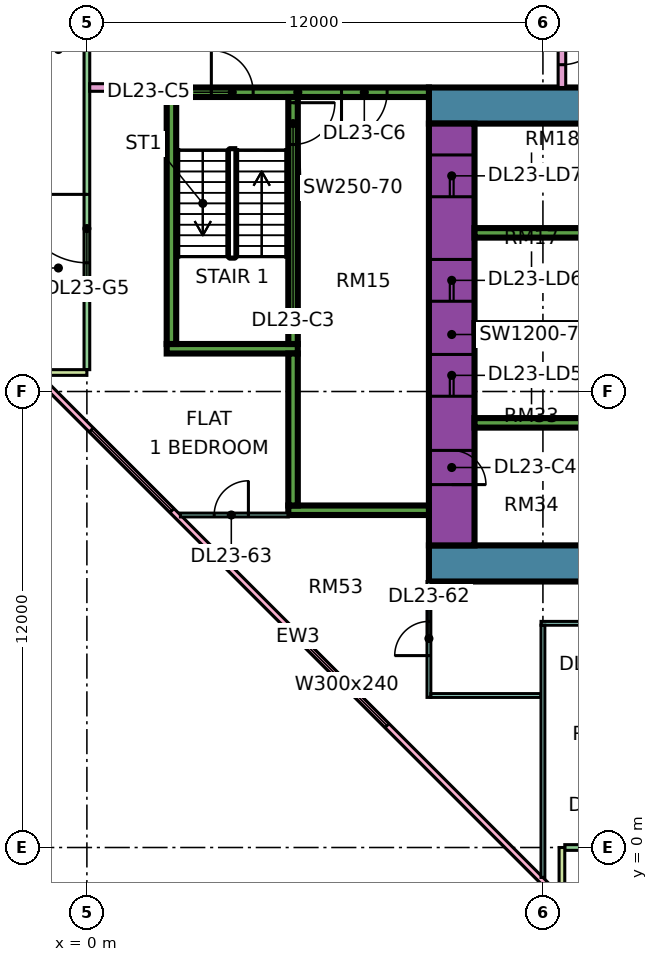
"""IFC4 building model, lengths in metres.
Left out: names, types, materials, properties, quantities, classifications, styles, units other than length and angle.
Written with IfcOpenShell. Run it as: python <this file> out.ifc"""

import sys

from ifc_helpers import new_model, si_unit, direction, frame, frame_2d, origin, place, context, subcontext, project, spatial, rectangle, extrude, element, fill, save


model = new_model("IFC4")
c1 = context("Model", 3, precision=1e-05, world=origin(), true_north=direction((0.0, 1.0)))
c2 = subcontext(c1, "Body", "Model", "MODEL_VIEW")
j1 = project(units=[si_unit("LENGTHUNIT", "METRE"), si_unit("PLANEANGLEUNIT", "RADIAN")], contexts=[c1])
p1 = place(None, origin())
s1 = spatial("IfcSite", under=j1, at=p1, CompositionType="ELEMENT")
p2 = place(p1, origin())
s2 = spatial("IfcBuilding", under=s1, at=p2, CompositionType="ELEMENT")
p3 = place(p2, frame((0.0, 0.0, 103.15)))
s3 = spatial("IfcBuildingStorey", under=s2, at=p3, CompositionType="ELEMENT", Elevation=103.15)
p4 = place(p3, frame((9.0, 7.475, 0.0), z_axis=(0.0, 0.0, 1.0), x_axis=(1.0, 0.0, 0.0)))
e1 = element("IfcWall", 1, at=p4, inside=s3, PredefinedType="SHEAR", context=c2, shape_type="SweptSolid", body=[
    extrude(rectangle(XDim=25.0, YDim=0.95, at=frame_2d((12.5, 0.0))), origin(), (0.0, 0.0, 1.0), 3.75),
])
p5 = place(p3, frame((9.0, 19.525, 0.0), z_axis=(0.0, 0.0, 1.0), x_axis=(1.0, 0.0, 0.0)))
e2 = element("IfcWall", 2, at=p5, inside=s3, PredefinedType="SHEAR", context=c2, shape_type="SweptSolid", body=[
    extrude(rectangle(XDim=25.0, YDim=0.95, at=frame_2d((12.5, 0.0))), origin(), (0.0, 0.0, 1.0), 3.75),
])
p6 = place(p5, frame((19.1, 0.0, 0.0)))
e3 = element("IfcOpeningElement", 3, at=p6, cuts=e2, PredefinedType="OPENING", context=c2, shape_type="SweptSolid", body=[
    extrude(rectangle(XDim=1.8, YDim=2.4, at=frame_2d((0.9, 1.2))), frame((0.0, 0.485, 0.0), z_axis=(0.0, -1.0, 0.0), x_axis=(1.0, 0.0, 0.0)), (0.0, 0.0, 1.0), 0.97),
])
p7 = place(p3, frame((9.6, 7.95, 0.0), z_axis=(0.0, 0.0, 1.0), x_axis=(0.0, 1.0, 0.0)))
e4 = element("IfcWall", 4, at=p7, inside=s3, PredefinedType="SHEAR", context=c2, shape_type="SweptSolid", body=[
    extrude(rectangle(XDim=11.1, YDim=1.2, at=frame_2d((5.55, 0.0))), origin(), (0.0, 0.0, 1.0), 3.75),
])
p8 = place(p7, frame((3.925, 0.0, 0.0)))
e5 = element("IfcOpeningElement", 5, at=p8, cuts=e4, PredefinedType="OPENING", context=c2, shape_type="SweptSolid", body=[
    extrude(rectangle(XDim=1.1, YDim=2.2, at=frame_2d((0.55, 1.1))), frame((0.0, 0.61, 0.0), z_axis=(0.0, -1.0, 0.0), x_axis=(1.0, 0.0, 0.0)), (0.0, 0.0, 1.0), 1.22),
])
p9 = place(p7, frame((6.425, 0.0, 0.0)))
e6 = element("IfcOpeningElement", 6, at=p9, cuts=e4, PredefinedType="OPENING", context=c2, shape_type="SweptSolid", body=[
    extrude(rectangle(XDim=1.1, YDim=2.2, at=frame_2d((0.55, 1.1))), frame((0.0, 0.61, 0.0), z_axis=(0.0, -1.0, 0.0), x_axis=(1.0, 0.0, 0.0)), (0.0, 0.0, 1.0), 1.22),
])
p10 = place(p7, frame((9.175, 0.0, 0.0)))
e7 = element("IfcOpeningElement", 7, at=p10, cuts=e4, PredefinedType="OPENING", context=c2, shape_type="SweptSolid", body=[
    extrude(rectangle(XDim=1.1, YDim=2.2, at=frame_2d((0.55, 1.1))), frame((0.0, 0.61, 0.0), z_axis=(0.0, -1.0, 0.0), x_axis=(1.0, 0.0, 0.0)), (0.0, 0.0, 1.0), 1.22),
])
p11 = place(p7, frame((1.6, 0.0, 0.0)))
e8 = element("IfcOpeningElement", 8, at=p11, cuts=e4, PredefinedType="OPENING", context=c2, shape_type="SweptSolid", body=[
    extrude(rectangle(XDim=0.9, YDim=2.1, at=frame_2d((0.45, 1.05))), frame((0.0, 0.61, 0.0), z_axis=(0.0, -1.0, 0.0), x_axis=(1.0, 0.0, 0.0)), (0.0, 0.0, 1.0), 1.22),
])
for number, where, z_axis, x_axis in (
    (9, (10.2, 11.175, 0.0), (0.0, 0.0, 1.0), (1.0, 0.0, 0.0)),
    (10, (10.2, 13.675, 0.0), (0.0, 0.0, 1.0), (1.0, 0.0, 0.0)),
    (11, (10.2, 16.175, 0.0), (0.0, 0.0, 1.0), (1.0, 0.0, 0.0)),
):
    element("IfcWall", number, at=place(p3, frame(where, z_axis=z_axis, x_axis=x_axis)), inside=s3, PredefinedType="SHEAR", context=c2, shape_type="SweptSolid", body=[
        extrude(rectangle(XDim=3.0, YDim=0.25, at=frame_2d((1.5, 0.0))), origin(), (0.0, 0.0, 1.0), 3.75),
    ])
p12 = place(p3, frame((2.1, 19.875, 0.0), z_axis=(0.0, 0.0, 1.0), x_axis=(1.0, 0.0, 0.0)))
e12 = element("IfcWall", 12, at=p12, inside=s3, PredefinedType="SHEAR", context=c2, shape_type="SweptSolid", body=[
    extrude(rectangle(XDim=6.9, YDim=0.25, at=frame_2d((3.45, 0.0))), origin(), (0.0, 0.0, 1.0), 3.75),
])
p13 = place(p12, frame((1.175, 0.0, 0.0)))
e13 = element("IfcOpeningElement", 13, at=p13, cuts=e12, PredefinedType="OPENING", context=c2, shape_type="SweptSolid", body=[
    extrude(rectangle(XDim=1.1, YDim=2.2, at=frame_2d((0.55, 1.1))), frame((0.0, 0.135, 0.0), z_axis=(0.0, -1.0, 0.0), x_axis=(1.0, 0.0, 0.0)), (0.0, 0.0, 1.0), 0.27),
])
p14 = place(p12, frame((4.6, 0.0, 0.0)))
e14 = element("IfcOpeningElement", 14, at=p14, cuts=e12, PredefinedType="OPENING", context=c2, shape_type="SweptSolid", body=[
    extrude(rectangle(XDim=1.2, YDim=2.2, at=frame_2d((0.6, 1.1))), frame((0.0, 0.135, 0.0), z_axis=(0.0, -1.0, 0.0), x_axis=(1.0, 0.0, 0.0)), (0.0, 0.0, 1.0), 0.27),
])
p15 = place(p3, frame((2.1, 13.125, 0.0), z_axis=(0.0, 0.0, 1.0), x_axis=(1.0, 0.0, 0.0)))
e15 = element("IfcWall", 15, at=p15, inside=s3, PredefinedType="SHEAR", context=c2, shape_type="SweptSolid", body=[
    extrude(rectangle(XDim=3.45, YDim=0.25, at=frame_2d((1.725, 0.0))), origin(), (0.0, 0.0, 1.0), 3.75),
])
p16 = place(p3, frame((2.225, 13.25, 0.0), z_axis=(0.0, 0.0, 1.0), x_axis=(0.0, 1.0, 0.0)))
e16 = element("IfcWall", 16, at=p16, inside=s3, PredefinedType="SHEAR", context=c2, shape_type="SweptSolid", body=[
    extrude(rectangle(XDim=6.5, YDim=0.25, at=frame_2d((3.25, 0.0))), origin(), (0.0, 0.0, 1.0), 3.75),
])
p17 = place(p3, frame((5.425, 13.25, 0.0), z_axis=(0.0, 0.0, 1.0), x_axis=(0.0, 1.0, 0.0)))
e17 = element("IfcWall", 17, at=p17, inside=s3, PredefinedType="SHEAR", context=c2, shape_type="SweptSolid", body=[
    extrude(rectangle(XDim=6.5, YDim=0.25, at=frame_2d((3.25, 0.0))), origin(), (0.0, 0.0, 1.0), 3.75),
])
p18 = place(p17, frame((5.25, 0.0, 0.0)))
e18 = element("IfcOpeningElement", 18, at=p18, cuts=e17, PredefinedType="OPENING", context=c2, shape_type="SweptSolid", body=[
    extrude(rectangle(XDim=1.1, YDim=2.2, at=frame_2d((0.55, 1.1))), frame((0.0, 0.135, 0.0), z_axis=(0.0, -1.0, 0.0), x_axis=(1.0, 0.0, 0.0)), (0.0, 0.0, 1.0), 0.27),
])
p19 = place(p3, frame((5.3, 8.875, 0.0), z_axis=(0.0, 0.0, 1.0), x_axis=(1.0, 0.0, 0.0)))
e19 = element("IfcWall", 19, at=p19, inside=s3, PredefinedType="SHEAR", context=c2, shape_type="SweptSolid", body=[
    extrude(rectangle(XDim=3.7, YDim=0.25, at=frame_2d((1.85, 0.0))), origin(), (0.0, 0.0, 1.0), 3.75),
])
p20 = place(p3, frame((5.425, 9.0, 0.0), z_axis=(0.0, 0.0, 1.0), x_axis=(0.0, 1.0, 0.0)))
e20 = element("IfcWall", 20, at=p20, inside=s3, PredefinedType="SHEAR", context=c2, shape_type="SweptSolid", body=[
    extrude(rectangle(XDim=4.0, YDim=0.25, at=frame_2d((2.0, 0.0))), origin(), (0.0, 0.0, 1.0), 3.75),
])
p21 = place(p3, frame((0.0, 23.925, 0.0), z_axis=(0.0, 0.0, 1.0), x_axis=(0.0, -1.0, 0.0)))
e21 = element("IfcWall", 21, at=p21, inside=s3, PredefinedType="SOLIDWALL", context=c2, shape_type="SweptSolid", body=[
    extrude(rectangle(XDim=11.35, YDim=0.15, at=frame_2d((5.675, 0.0))), origin(), (0.0, 0.0, 1.0), 3.35),
])
p22 = place(p21, frame((6.738, 0.0, 0.0)))
e22 = element("IfcOpeningElement", 22, at=p22, cuts=e21, PredefinedType="OPENING", context=c2, shape_type="SweptSolid", body=[
    extrude(rectangle(XDim=1.8, YDim=2.4, at=frame_2d((0.9, 1.2))), frame((0.0, 0.085, 0.0), z_axis=(0.0, -1.0, 0.0), x_axis=(1.0, 0.0, 0.0)), (0.0, 0.0, 1.0), 0.17),
])
p23 = place(p3, frame((-1.5, 12.5, 0.0), z_axis=(0.0, 0.0, 1.0), x_axis=(1.0, 0.0, 0.0)))
e23 = element("IfcWall", 23, at=p23, inside=s3, PredefinedType="SOLIDWALL", context=c2, shape_type="SweptSolid", body=[
    extrude(rectangle(XDim=1.5, YDim=0.15, at=frame_2d((0.75, 0.0))), origin(), (0.0, 0.0, 1.0), 3.35),
])
p24 = place(p3, frame((-1.447, 12.553, 0.0), z_axis=(0.0, 0.0, 1.0), x_axis=(0.707106781187, -0.707106781187, 0.0)))
e24 = element("IfcWall", 24, at=p24, inside=s3, PredefinedType="SOLIDWALL", context=c2, shape_type="SweptSolid", body=[
    extrude(rectangle(XDim=19.799, YDim=0.15, at=frame_2d((9.899, 0.0))), origin(), (0.0, 0.0, 1.0), 3.35),
])
p25 = place(p24, frame((2.212, 0.0, 0.45)))
e25 = element("IfcOpeningElement", 25, at=p25, cuts=e24, PredefinedType="OPENING", context=c2, shape_type="SweptSolid", body=[
    extrude(rectangle(XDim=3.0, YDim=2.4, at=frame_2d((1.5, 1.2))), frame((0.0, 0.085, 0.0), z_axis=(0.0, -1.0, 0.0), x_axis=(1.0, 0.0, 0.0)), (0.0, 0.0, 1.0), 0.17),
])
p26 = place(p24, frame((10.216, 0.0, 0.45)))
e26 = element("IfcOpeningElement", 26, at=p26, cuts=e24, PredefinedType="OPENING", context=c2, shape_type="SweptSolid", body=[
    extrude(rectangle(XDim=3.0, YDim=2.4, at=frame_2d((1.5, 1.2))), frame((0.0, 0.085, 0.0), z_axis=(0.0, -1.0, 0.0), x_axis=(1.0, 0.0, 0.0)), (0.0, 0.0, 1.0), 0.17),
])
p27 = place(p3, frame((12.575, 0.0, 0.0), z_axis=(0.0, 0.0, 1.0), x_axis=(1.0, 0.0, 0.0)))
e27 = element("IfcWall", 27, at=p27, inside=s3, PredefinedType="SOLIDWALL", context=c2, shape_type="SweptSolid", body=[
    extrude(rectangle(XDim=11.35, YDim=0.15, at=frame_2d((5.675, 0.0))), origin(), (0.0, 0.0, 1.0), 3.35),
])
p28 = place(p27, frame((0.613, 0.0, 0.0)))
e28 = element("IfcOpeningElement", 28, at=p28, cuts=e27, PredefinedType="OPENING", context=c2, shape_type="SweptSolid", body=[
    extrude(rectangle(XDim=1.2, YDim=2.4, at=frame_2d((0.6, 1.2))), frame((0.0, 0.085, 0.0), z_axis=(0.0, -1.0, 0.0), x_axis=(1.0, 0.0, 0.0)), (0.0, 0.0, 1.0), 0.17),
])
p29 = place(p27, frame((5.125, 0.0, 0.45)))
e29 = element("IfcOpeningElement", 29, at=p29, cuts=e27, PredefinedType="OPENING", context=c2, shape_type="SweptSolid", body=[
    extrude(rectangle(XDim=3.0, YDim=2.4, at=frame_2d((1.5, 1.2))), frame((0.0, 0.085, 0.0), z_axis=(0.0, -1.0, 0.0), x_axis=(1.0, 0.0, 0.0)), (0.0, 0.0, 1.0), 0.17),
])
p30 = place(p3, frame((12.5, -1.5, 0.0), z_axis=(0.0, 0.0, 1.0), x_axis=(0.0, 1.0, 0.0)))
e30 = element("IfcWall", 30, at=p30, inside=s3, PredefinedType="SOLIDWALL", context=c2, shape_type="SweptSolid", body=[
    extrude(rectangle(XDim=1.5, YDim=0.15, at=frame_2d((0.75, 0.0))), origin(), (0.0, 0.0, 1.0), 3.35),
])
p31 = place(p3, frame((0.074, 20.0, 0.0), z_axis=(0.0, 0.0, 1.0), x_axis=(1.0, 0.0, 0.0)))
e31 = element("IfcWall", 31, at=p31, inside=s3, PredefinedType="PARTITIONING", context=c2, shape_type="SweptSolid", body=[
    extrude(rectangle(XDim=2.026, YDim=0.2, at=frame_2d((1.013, 0.0))), origin(), (0.0, 0.0, 1.0), 3.35),
])
p32 = place(p3, frame((2.461, 8.75, 0.0), z_axis=(0.0, 0.0, 1.0), x_axis=(1.0, 0.0, 0.0)))
e32 = element("IfcWall", 32, at=p32, inside=s3, PredefinedType="PARTITIONING", context=c2, shape_type="SweptSolid", body=[
    extrude(rectangle(XDim=2.839, YDim=0.1, at=frame_2d((1.419, 0.0))), origin(), (0.0, 0.0, 1.0), 3.35),
])
p33 = place(p32, frame((0.889, 0.0, 0.0)))
e33 = element("IfcOpeningElement", 33, at=p33, cuts=e32, PredefinedType="OPENING", context=c2, shape_type="SweptSolid", body=[
    extrude(rectangle(XDim=0.9, YDim=2.1, at=frame_2d((0.45, 1.05))), frame((0.0, 0.06, 0.0), z_axis=(0.0, -1.0, 0.0), x_axis=(1.0, 0.0, 0.0)), (0.0, 0.0, 1.0), 0.12),
])
p34 = place(p3, frame((9.0, 3.95, 0.0), z_axis=(0.0, 0.0, 1.0), x_axis=(0.0, 1.0, 0.0)))
e34 = element("IfcWall", 34, at=p34, inside=s3, PredefinedType="PARTITIONING", context=c2, shape_type="SweptSolid", body=[
    extrude(rectangle(XDim=3.05, YDim=0.1, at=frame_2d((1.525, 0.0))), origin(), (0.0, 0.0, 1.0), 3.35),
])
p35 = place(p34, frame((1.1, 0.0, 0.0)))
e35 = element("IfcOpeningElement", 35, at=p35, cuts=e34, PredefinedType="OPENING", context=c2, shape_type="SweptSolid", body=[
    extrude(rectangle(XDim=0.9, YDim=2.1, at=frame_2d((0.45, 1.05))), frame((0.0, 0.06, 0.0), z_axis=(0.0, -1.0, 0.0), x_axis=(1.0, 0.0, 0.0)), (0.0, 0.0, 1.0), 0.12),
])
p36 = place(p3, frame((9.05, 4.0, 0.0), z_axis=(0.0, 0.0, 1.0), x_axis=(1.0, 0.0, 0.0)))
e36 = element("IfcWall", 36, at=p36, inside=s3, PredefinedType="PARTITIONING", context=c2, shape_type="SweptSolid", body=[
    extrude(rectangle(XDim=2.9, YDim=0.1, at=frame_2d((1.45, 0.0))), origin(), (0.0, 0.0, 1.0), 3.35),
])
p37 = place(p3, frame((11.95, 5.9, 0.0), z_axis=(0.0, 0.0, 1.0), x_axis=(1.0, 0.0, 0.0)))
e37 = element("IfcWall", 37, at=p37, inside=s3, PredefinedType="PARTITIONING", context=c2, shape_type="SweptSolid", body=[
    extrude(rectangle(XDim=21.1, YDim=0.1, at=frame_2d((10.55, 0.0))), origin(), (0.0, 0.0, 1.0), 3.35),
])
p38 = place(p37, frame((1.1, 0.0, 0.0)))
e38 = element("IfcOpeningElement", 38, at=p38, cuts=e37, PredefinedType="OPENING", context=c2, shape_type="SweptSolid", body=[
    extrude(rectangle(XDim=0.9, YDim=2.1, at=frame_2d((0.45, 1.05))), frame((0.0, 0.06, 0.0), z_axis=(0.0, -1.0, 0.0), x_axis=(1.0, 0.0, 0.0)), (0.0, 0.0, 1.0), 0.12),
])
p39 = place(p37, frame((13.1, 0.0, 0.0)))
e39 = element("IfcOpeningElement", 39, at=p39, cuts=e37, PredefinedType="OPENING", context=c2, shape_type="SweptSolid", body=[
    extrude(rectangle(XDim=0.9, YDim=2.1, at=frame_2d((0.45, 1.05))), frame((0.0, 0.06, 0.0), z_axis=(0.0, -1.0, 0.0), x_axis=(1.0, 0.0, 0.0)), (0.0, 0.0, 1.0), 0.12),
])
p40 = place(p37, frame((16.1, 0.0, 0.0)))
e40 = element("IfcOpeningElement", 40, at=p40, cuts=e37, PredefinedType="OPENING", context=c2, shape_type="SweptSolid", body=[
    extrude(rectangle(XDim=0.9, YDim=2.1, at=frame_2d((0.45, 1.05))), frame((0.0, 0.06, 0.0), z_axis=(0.0, -1.0, 0.0), x_axis=(1.0, 0.0, 0.0)), (0.0, 0.0, 1.0), 0.12),
])
p41 = place(p37, frame((7.1, 0.0, 0.0)))
e41 = element("IfcOpeningElement", 41, at=p41, cuts=e37, PredefinedType="OPENING", context=c2, shape_type="SweptSolid", body=[
    extrude(rectangle(XDim=0.9, YDim=2.1, at=frame_2d((0.45, 1.05))), frame((0.0, 0.06, 0.0), z_axis=(0.0, -1.0, 0.0), x_axis=(1.0, 0.0, 0.0)), (0.0, 0.0, 1.0), 0.12),
])
p42 = place(p3, frame((12.0, -0.788, 0.0), z_axis=(0.0, 0.0, 1.0), x_axis=(0.0, 1.0, 0.0)))
e42 = element("IfcWall", 42, at=p42, inside=s3, PredefinedType="PARTITIONING", context=c2, shape_type="SweptSolid", body=[
    extrude(rectangle(XDim=6.638, YDim=0.1, at=frame_2d((3.319, 0.0))), origin(), (0.0, 0.0, 1.0), 3.35),
])
p43 = place(p3, frame((12.5, 20.0, 0.0), z_axis=(0.0, 0.0, 1.0), x_axis=(0.0, 1.0, 0.0)))
e43 = element("IfcWall", 43, at=p43, inside=s3, PredefinedType="PARTITIONING", context=c2, shape_type="SweptSolid", body=[
    extrude(rectangle(XDim=42.926, YDim=0.2, at=frame_2d((21.463, 0.0))), origin(), (0.0, 0.0, 1.0), 3.35),
])
p44 = place(p43, frame((28.65, 0.0, 0.0)))
e44 = element("IfcOpeningElement", 44, at=p44, cuts=e43, PredefinedType="OPENING", context=c2, shape_type="SweptSolid", body=[
    extrude(rectangle(XDim=1.0, YDim=2.1, at=frame_2d((0.5, 1.05))), frame((0.0, 0.11, 0.0), z_axis=(0.0, -1.0, 0.0), x_axis=(1.0, 0.0, 0.0)), (0.0, 0.0, 1.0), 0.22),
])
p45 = place(p43, frame((32.1, 0.0, 0.0)))
e45 = element("IfcOpeningElement", 45, at=p45, cuts=e43, PredefinedType="OPENING", context=c2, shape_type="SweptSolid", body=[
    extrude(rectangle(XDim=1.0, YDim=2.1, at=frame_2d((0.5, 1.05))), frame((0.0, 0.11, 0.0), z_axis=(0.0, -1.0, 0.0), x_axis=(1.0, 0.0, 0.0)), (0.0, 0.0, 1.0), 0.22),
])
p46 = place(p43, frame((0.6, 0.0, 0.0)))
e46 = element("IfcOpeningElement", 46, at=p46, cuts=e43, PredefinedType="OPENING", context=c2, shape_type="SweptSolid", body=[
    extrude(rectangle(XDim=1.2, YDim=2.1, at=frame_2d((0.6, 1.05))), frame((0.0, 0.11, 0.0), z_axis=(0.0, -1.0, 0.0), x_axis=(1.0, 0.0, 0.0)), (0.0, 0.0, 1.0), 0.22),
])
p47 = place(p43, frame((13.95, 0.0, 0.0)))
e47 = element("IfcOpeningElement", 47, at=p47, cuts=e43, PredefinedType="OPENING", context=c2, shape_type="SweptSolid", body=[
    extrude(rectangle(XDim=1.0, YDim=2.1, at=frame_2d((0.5, 1.05))), frame((0.0, 0.11, 0.0), z_axis=(0.0, -1.0, 0.0), x_axis=(1.0, 0.0, 0.0)), (0.0, 0.0, 1.0), 0.22),
])
p48 = place(p22, frame((1.8, 0.0, 0.0), z_axis=(0.0, 0.0, 1.0), x_axis=(-1.0, 0.0, 0.0)))
e48 = element("IfcDoor", 48, at=p48, inside=s3, OperationType="DOUBLE_DOOR_SINGLE_SWING", PredefinedType="DOOR", context=c2, shape_type="SweptSolid", body=[
    extrude(rectangle(XDim=1.8, YDim=2.4, at=frame_2d((0.9, 1.2))), frame((0.0, 0.025, 0.0), z_axis=(0.0, -1.0, 0.0), x_axis=(1.0, 0.0, 0.0)), (0.0, 0.0, 1.0), 0.05),
])
fill(e22, e48)
p49 = place(p25, origin())
e49 = element("IfcWindow", 49, at=p49, inside=s3, PartitioningType="SINGLE_PANEL", PredefinedType="WINDOW", context=c2, shape_type="SweptSolid", body=[
    extrude(rectangle(XDim=3.0, YDim=2.4, at=frame_2d((1.5, 1.2))), frame((0.0, 0.03, 0.0), z_axis=(0.0, -1.0, 0.0), x_axis=(1.0, 0.0, 0.0)), (0.0, 0.0, 1.0), 0.06),
])
fill(e25, e49)
p50 = place(p26, origin())
e50 = element("IfcWindow", 50, at=p50, inside=s3, PartitioningType="SINGLE_PANEL", PredefinedType="WINDOW", context=c2, shape_type="SweptSolid", body=[
    extrude(rectangle(XDim=3.0, YDim=2.4, at=frame_2d((1.5, 1.2))), frame((0.0, 0.03, 0.0), z_axis=(0.0, -1.0, 0.0), x_axis=(1.0, 0.0, 0.0)), (0.0, 0.0, 1.0), 0.06),
])
fill(e26, e50)
p51 = place(p8, origin())
e51 = element("IfcDoor", 51, at=p51, inside=s3, OperationType="DOUBLE_DOOR_SLIDING", PredefinedType="DOOR", context=c2, shape_type="SweptSolid", body=[
    extrude(rectangle(XDim=1.1, YDim=2.2, at=frame_2d((0.55, 1.1))), frame((0.0, 0.025, 0.0), z_axis=(0.0, -1.0, 0.0), x_axis=(1.0, 0.0, 0.0)), (0.0, 0.0, 1.0), 0.05),
])
fill(e5, e51)
p52 = place(p9, origin())
e52 = element("IfcDoor", 52, at=p52, inside=s3, OperationType="DOUBLE_DOOR_SLIDING", PredefinedType="DOOR", context=c2, shape_type="SweptSolid", body=[
    extrude(rectangle(XDim=1.1, YDim=2.2, at=frame_2d((0.55, 1.1))), frame((0.0, 0.025, 0.0), z_axis=(0.0, -1.0, 0.0), x_axis=(1.0, 0.0, 0.0)), (0.0, 0.0, 1.0), 0.05),
])
fill(e6, e52)
p53 = place(p10, origin())
e53 = element("IfcDoor", 53, at=p53, inside=s3, OperationType="DOUBLE_DOOR_SLIDING", PredefinedType="DOOR", context=c2, shape_type="SweptSolid", body=[
    extrude(rectangle(XDim=1.1, YDim=2.2, at=frame_2d((0.55, 1.1))), frame((0.0, 0.025, 0.0), z_axis=(0.0, -1.0, 0.0), x_axis=(1.0, 0.0, 0.0)), (0.0, 0.0, 1.0), 0.05),
])
fill(e7, e53)
p54 = place(p18, origin())
e54 = element("IfcDoor", 54, at=p54, inside=s3, OperationType="SINGLE_SWING_RIGHT", PredefinedType="DOOR", context=c2, shape_type="SweptSolid", body=[
    extrude(rectangle(XDim=1.1, YDim=2.2, at=frame_2d((0.55, 1.1))), frame((0.0, 0.025, 0.0), z_axis=(0.0, -1.0, 0.0), x_axis=(1.0, 0.0, 0.0)), (0.0, 0.0, 1.0), 0.05),
])
fill(e18, e54)
p55 = place(p11, frame((0.9, 0.0, 0.0), z_axis=(0.0, 0.0, 1.0), x_axis=(-1.0, 0.0, 0.0)))
e55 = element("IfcDoor", 55, at=p55, inside=s3, OperationType="SINGLE_SWING_LEFT", PredefinedType="DOOR", context=c2, shape_type="SweptSolid", body=[
    extrude(rectangle(XDim=0.9, YDim=2.1, at=frame_2d((0.45, 1.05))), frame((0.0, 0.025, 0.0), z_axis=(0.0, -1.0, 0.0), x_axis=(1.0, 0.0, 0.0)), (0.0, 0.0, 1.0), 0.05),
])
fill(e8, e55)
p56 = place(p13, origin())
e56 = element("IfcDoor", 56, at=p56, inside=s3, OperationType="SINGLE_SWING_LEFT", PredefinedType="DOOR", context=c2, shape_type="SweptSolid", body=[
    extrude(rectangle(XDim=1.1, YDim=2.2, at=frame_2d((0.55, 1.1))), frame((0.0, 0.025, 0.0), z_axis=(0.0, -1.0, 0.0), x_axis=(1.0, 0.0, 0.0)), (0.0, 0.0, 1.0), 0.05),
])
fill(e13, e56)
p57 = place(p14, frame((1.2, 0.0, 0.0), z_axis=(0.0, 0.0, 1.0), x_axis=(-1.0, 0.0, 0.0)))
e57 = element("IfcDoor", 57, at=p57, inside=s3, OperationType="SINGLE_SWING_LEFT", PredefinedType="DOOR", context=c2, shape_type="SweptSolid", body=[
    extrude(rectangle(XDim=1.2, YDim=2.2, at=frame_2d((0.6, 1.1))), frame((0.0, 0.025, 0.0), z_axis=(0.0, -1.0, 0.0), x_axis=(1.0, 0.0, 0.0)), (0.0, 0.0, 1.0), 0.05),
])
fill(e14, e57)
p58 = place(p46, origin())
e58 = element("IfcDoor", 58, at=p58, inside=s3, OperationType="SINGLE_SWING_RIGHT", PredefinedType="DOOR", context=c2, shape_type="SweptSolid", body=[
    extrude(rectangle(XDim=1.2, YDim=2.1, at=frame_2d((0.6, 1.05))), frame((0.0, 0.025, 0.0), z_axis=(0.0, -1.0, 0.0), x_axis=(1.0, 0.0, 0.0)), (0.0, 0.0, 1.0), 0.05),
])
fill(e46, e58)
p59 = place(p35, origin())
e59 = element("IfcDoor", 59, at=p59, inside=s3, OperationType="SINGLE_SWING_LEFT", PredefinedType="DOOR", context=c2, shape_type="SweptSolid", body=[
    extrude(rectangle(XDim=0.9, YDim=2.1, at=frame_2d((0.45, 1.05))), frame((0.0, 0.025, 0.0), z_axis=(0.0, -1.0, 0.0), x_axis=(1.0, 0.0, 0.0)), (0.0, 0.0, 1.0), 0.05),
])
fill(e35, e59)
p60 = place(p33, frame((0.9, 0.0, 0.0), z_axis=(0.0, 0.0, 1.0), x_axis=(-1.0, 0.0, 0.0)))
e60 = element("IfcDoor", 60, at=p60, inside=s3, OperationType="SINGLE_SWING_RIGHT", PredefinedType="DOOR", context=c2, shape_type="SweptSolid", body=[
    extrude(rectangle(XDim=0.9, YDim=2.1, at=frame_2d((0.45, 1.05))), frame((0.0, 0.025, 0.0), z_axis=(0.0, -1.0, 0.0), x_axis=(1.0, 0.0, 0.0)), (0.0, 0.0, 1.0), 0.05),
])
fill(e33, e60)
save(model, sys.argv[1])
